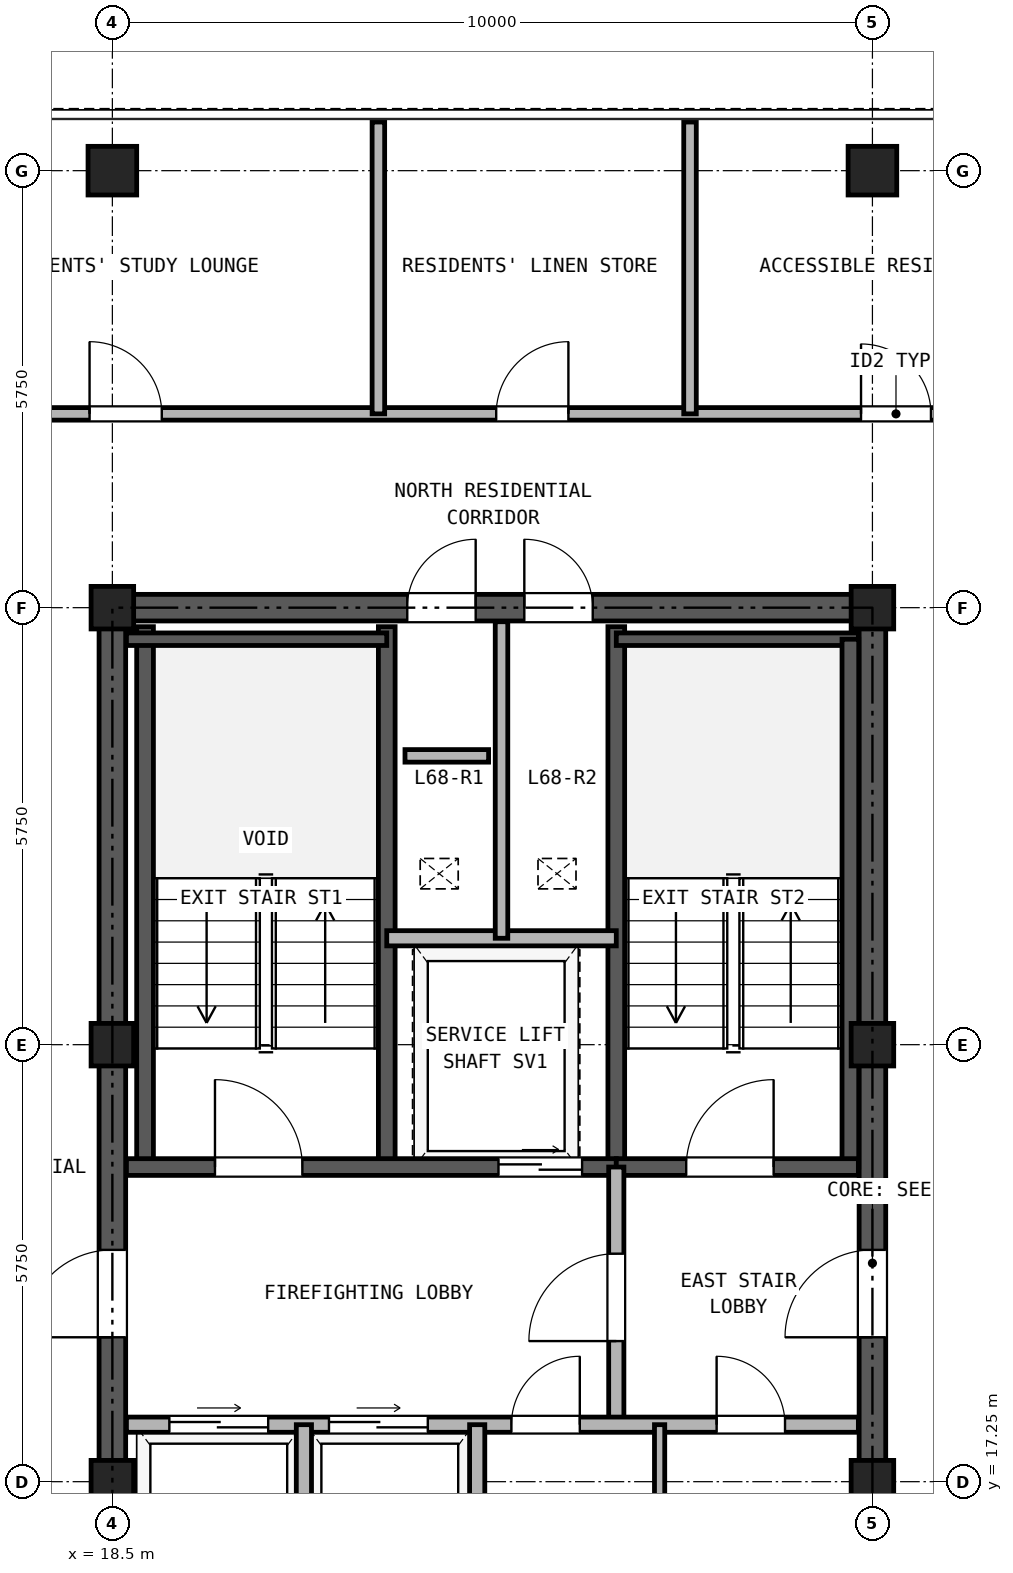
"""IFC4 building model, lengths in metres.
Left out: names, types, materials, properties, quantities, classifications, styles, units other than length and angle.
Written with IfcOpenShell. Run it as: python <this file> out.ifc"""

import sys

from ifc_helpers import new_model, si_unit, direction, frame, frame_2d, origin, origin_2d, place, context, subcontext, project, spatial, rectangle, hollow_rectangle, extrude, source, transform, mapped, element, fill, save


model = new_model("IFC4")
c1 = context("Model", 3, precision=1e-05, world=origin(), true_north=direction((0.0, 1.0)))
c2 = subcontext(c1, "Body", "Model", "MODEL_VIEW")
j1 = project(units=[si_unit("LENGTHUNIT", "METRE"), si_unit("PLANEANGLEUNIT", "RADIAN")], contexts=[c1])
p1 = place(None, origin())
s1 = spatial("IfcSite", under=j1, at=p1, CompositionType="ELEMENT")
p2 = place(p1, origin())
s2 = spatial("IfcBuilding", under=s1, at=p2, CompositionType="ELEMENT")
p3 = place(p2, frame((0.0, 0.0, 239.3)))
s3 = spatial("IfcBuildingStorey", under=s2, at=p3, CompositionType="ELEMENT", Elevation=239.3)
m1 = source(origin(), c2, "Body", "SweptSolid", [
    extrude(hollow_rectangle(XDim=0.64, YDim=0.64, WallThickness=0.035, at=origin_2d()), origin(), (0.0, 0.0, 1.0), 2.98),
])
for number, where, z_axis, x_axis in (
    (1, (18.5, 34.5, 0.0), (0.0, 0.0, 1.0), (1.0, 0.0, 0.0)),
    (2, (28.5, 34.5, 0.0), (0.0, 0.0, 1.0), (1.0, 0.0, 0.0)),
):
    element("IfcColumn", number, at=place(p3, frame(where, z_axis=z_axis, x_axis=x_axis)), inside=s3, PredefinedType="COLUMN", context=c2, shape_type="MappedRepresentation", body=[
        mapped(m1, transform((0.0, 0.0, 0.0), x_axis=(1.0, 0.0, 0.0), y_axis=(0.0, 1.0, 0.0), z_axis=(0.0, 0.0, 1.0), scale=1.0)),
    ])
m2 = source(origin(), c2, "Body", "SweptSolid", [
    extrude(hollow_rectangle(XDim=0.56, YDim=0.56, WallThickness=0.03, at=origin_2d()), origin(), (0.0, 0.0, 1.0), 2.98),
])
for number, where, z_axis, x_axis in (
    (3, (18.5, 17.25, 0.0), (0.0, 0.0, 1.0), (1.0, 0.0, 0.0)),
    (4, (18.5, 23.0, 0.0), (0.0, 0.0, 1.0), (1.0, 0.0, 0.0)),
    (5, (18.5, 28.75, 0.0), (0.0, 0.0, 1.0), (1.0, 0.0, 0.0)),
    (6, (28.5, 17.25, 0.0), (0.0, 0.0, 1.0), (1.0, 0.0, 0.0)),
    (7, (28.5, 23.0, 0.0), (0.0, 0.0, 1.0), (1.0, 0.0, 0.0)),
    (8, (28.5, 28.75, 0.0), (0.0, 0.0, 1.0), (1.0, 0.0, 0.0)),
):
    element("IfcColumn", number, at=place(p3, frame(where, z_axis=z_axis, x_axis=x_axis)), inside=s3, PredefinedType="COLUMN", context=c2, shape_type="MappedRepresentation", body=[
        mapped(m2, transform((0.0, 0.0, 0.0), x_axis=(1.0, 0.0, 0.0), y_axis=(0.0, 1.0, 0.0), z_axis=(0.0, 0.0, 1.0), scale=1.0)),
    ])
p4 = place(p3, frame((18.325, 28.75, 0.0), z_axis=(0.0, 0.0, 1.0), x_axis=(1.0, 0.0, 0.0)))
e9 = element("IfcWall", 9, at=p4, inside=s3, PredefinedType="SHEAR", context=c2, shape_type="SweptSolid", body=[
    extrude(rectangle(XDim=10.35, YDim=0.35, at=frame_2d((5.175, 0.0))), origin(), (0.0, 0.0, 1.0), 2.98),
])
p5 = place(p4, frame((4.055, 0.0, 0.0)))
e10 = element("IfcOpeningElement", 10, at=p5, cuts=e9, PredefinedType="OPENING", context=c2, shape_type="SweptSolid", body=[
    extrude(rectangle(XDim=0.9, YDim=2.05, at=frame_2d((0.45, 1.025))), frame((0.0, 0.185, 0.0), z_axis=(0.0, -1.0, 0.0), x_axis=(1.0, 0.0, 0.0)), (0.0, 0.0, 1.0), 0.37),
])
p6 = place(p4, frame((5.595, 0.0, 0.0)))
e11 = element("IfcOpeningElement", 11, at=p6, cuts=e9, PredefinedType="OPENING", context=c2, shape_type="SweptSolid", body=[
    extrude(rectangle(XDim=0.9, YDim=2.05, at=frame_2d((0.45, 1.025))), frame((0.0, 0.185, 0.0), z_axis=(0.0, -1.0, 0.0), x_axis=(1.0, 0.0, 0.0)), (0.0, 0.0, 1.0), 0.37),
])
p7 = place(p3, frame((18.5, 11.675, 0.0), z_axis=(0.0, 0.0, 1.0), x_axis=(0.0, 1.0, 0.0)))
e12 = element("IfcWall", 12, at=p7, inside=s3, PredefinedType="SHEAR", context=c2, shape_type="SweptSolid", body=[
    extrude(rectangle(XDim=16.9, YDim=0.35, at=frame_2d((8.45, 0.0))), origin(), (0.0, 0.0, 1.0), 2.98),
])
p8 = place(p7, frame((7.475, 0.0, 0.0)))
e13 = element("IfcOpeningElement", 13, at=p8, cuts=e12, PredefinedType="OPENING", context=c2, shape_type="SweptSolid", body=[
    extrude(rectangle(XDim=1.15, YDim=2.2, at=frame_2d((0.575, 1.1))), frame((0.0, 0.185, 0.0), z_axis=(0.0, -1.0, 0.0), x_axis=(1.0, 0.0, 0.0)), (0.0, 0.0, 1.0), 0.37),
])
p9 = place(p3, frame((28.5, 11.675, 0.0), z_axis=(0.0, 0.0, 1.0), x_axis=(0.0, 1.0, 0.0)))
e14 = element("IfcWall", 14, at=p9, inside=s3, PredefinedType="SHEAR", context=c2, shape_type="SweptSolid", body=[
    extrude(rectangle(XDim=16.9, YDim=0.35, at=frame_2d((8.45, 0.0))), origin(), (0.0, 0.0, 1.0), 2.98),
])
p10 = place(p9, frame((7.475, 0.0, 0.0)))
e15 = element("IfcOpeningElement", 15, at=p10, cuts=e14, PredefinedType="OPENING", context=c2, shape_type="SweptSolid", body=[
    extrude(rectangle(XDim=1.15, YDim=2.2, at=frame_2d((0.575, 1.1))), frame((0.0, 0.185, 0.0), z_axis=(0.0, -1.0, 0.0), x_axis=(1.0, 0.0, 0.0)), (0.0, 0.0, 1.0), 0.37),
])
for number, where, z_axis, x_axis in (
    (16, (18.93, 21.39, 0.0), (0.0, 0.0, 1.0), (0.0, 1.0, 0.0)),
    (17, (22.11, 21.39, 0.0), (0.0, 0.0, 1.0), (0.0, 1.0, 0.0)),
    (18, (25.13, 21.39, 0.0), (0.0, 0.0, 1.0), (0.0, 1.0, 0.0)),
):
    element("IfcWall", number, at=place(p3, frame(where, z_axis=z_axis, x_axis=x_axis)), inside=s3, PredefinedType="SOLIDWALL", context=c2, shape_type="SweptSolid", body=[
        extrude(rectangle(XDim=7.11, YDim=0.22, at=frame_2d((3.555, 0.0))), origin(), (0.0, 0.0, 1.0), 2.98),
    ])
p11 = place(p3, frame((18.685, 28.335, 0.0), z_axis=(0.0, 0.0, 1.0), x_axis=(1.0, 0.0, 0.0)))
e19 = element("IfcWall", 19, at=p11, inside=s3, PredefinedType="PARTITIONING", context=c2, shape_type="SweptSolid", body=[
    extrude(rectangle(XDim=3.425, YDim=0.165, at=frame_2d((1.712, 0.0))), origin(), (0.0, 0.0, 1.0), 2.98),
])
p12 = place(p3, frame((25.13, 28.335, 0.0), z_axis=(0.0, 0.0, 1.0), x_axis=(1.0, 0.0, 0.0)))
e20 = element("IfcWall", 20, at=p12, inside=s3, PredefinedType="PARTITIONING", context=c2, shape_type="SweptSolid", body=[
    extrude(rectangle(XDim=3.185, YDim=0.165, at=frame_2d((1.593, 0.0))), origin(), (0.0, 0.0, 1.0), 2.98),
])
p13 = place(p3, frame((28.21, 21.39, 0.0), z_axis=(0.0, 0.0, 1.0), x_axis=(0.0, 1.0, 0.0)))
e21 = element("IfcWall", 21, at=p13, inside=s3, PredefinedType="SOLIDWALL", context=c2, shape_type="SweptSolid", body=[
    extrude(rectangle(XDim=6.945, YDim=0.22, at=frame_2d((3.473, 0.0))), origin(), (0.0, 0.0, 1.0), 2.98),
])
p14 = place(p3, frame((18.685, 21.39, 0.0), z_axis=(0.0, 0.0, 1.0), x_axis=(1.0, 0.0, 0.0)))
e22 = element("IfcWall", 22, at=p14, inside=s3, PredefinedType="SOLIDWALL", context=c2, shape_type="SweptSolid", body=[
    extrude(rectangle(XDim=6.445, YDim=0.22, at=frame_2d((3.222, 0.0))), origin(), (0.0, 0.0, 1.0), 2.98),
])
p15 = place(p14, frame((1.165, 0.0, 0.0)))
e23 = element("IfcOpeningElement", 23, at=p15, cuts=e22, PredefinedType="OPENING", context=c2, shape_type="SweptSolid", body=[
    extrude(rectangle(XDim=1.15, YDim=2.2, at=frame_2d((0.575, 1.1))), frame((0.0, 0.12, 0.0), z_axis=(0.0, -1.0, 0.0), x_axis=(1.0, 0.0, 0.0)), (0.0, 0.0, 1.0), 0.24),
])
p16 = place(p14, frame((4.895, 0.0, 0.0)))
e24 = element("IfcOpeningElement", 24, at=p16, cuts=e22, PredefinedType="OPENING", context=c2, shape_type="SweptSolid", body=[
    extrude(rectangle(XDim=1.1, YDim=2.25, at=frame_2d((0.55, 1.125))), frame((0.0, 0.12, 0.0), z_axis=(0.0, -1.0, 0.0), x_axis=(1.0, 0.0, 0.0)), (0.0, 0.0, 1.0), 0.24),
])
p17 = place(p3, frame((25.13, 21.39, 0.0), z_axis=(0.0, 0.0, 1.0), x_axis=(1.0, 0.0, 0.0)))
e25 = element("IfcWall", 25, at=p17, inside=s3, PredefinedType="SOLIDWALL", context=c2, shape_type="SweptSolid", body=[
    extrude(rectangle(XDim=3.185, YDim=0.22, at=frame_2d((1.593, 0.0))), origin(), (0.0, 0.0, 1.0), 2.98),
])
p18 = place(p17, frame((0.92, 0.0, 0.0)))
e26 = element("IfcOpeningElement", 26, at=p18, cuts=e25, PredefinedType="OPENING", context=c2, shape_type="SweptSolid", body=[
    extrude(rectangle(XDim=1.15, YDim=2.2, at=frame_2d((0.575, 1.1))), frame((0.0, 0.12, 0.0), z_axis=(0.0, -1.0, 0.0), x_axis=(1.0, 0.0, 0.0)), (0.0, 0.0, 1.0), 0.24),
])
p19 = place(p3, frame((22.11, 24.4, 0.0), z_axis=(0.0, 0.0, 1.0), x_axis=(1.0, 0.0, 0.0)))
e27 = element("IfcWall", 27, at=p19, inside=s3, PredefinedType="PARTITIONING", context=c2, shape_type="SweptSolid", body=[
    extrude(rectangle(XDim=3.02, YDim=0.2, at=frame_2d((1.51, 0.0))), origin(), (0.0, 0.0, 1.0), 2.98),
])
p20 = place(p3, frame((23.62, 24.4, 0.0), z_axis=(0.0, 0.0, 1.0), x_axis=(0.0, 1.0, 0.0)))
e28 = element("IfcWall", 28, at=p20, inside=s3, PredefinedType="PARTITIONING", context=c2, shape_type="SweptSolid", body=[
    extrude(rectangle(XDim=4.165, YDim=0.165, at=frame_2d((2.083, 0.0))), origin(), (0.0, 0.0, 1.0), 2.98),
])
p21 = place(p3, frame((25.13, 18.0, 0.0), z_axis=(0.0, 0.0, 1.0), x_axis=(0.0, 1.0, 0.0)))
e29 = element("IfcWall", 29, at=p21, inside=s3, PredefinedType="PARTITIONING", context=c2, shape_type="SweptSolid", body=[
    extrude(rectangle(XDim=3.39, YDim=0.2, at=frame_2d((1.695, 0.0))), origin(), (0.0, 0.0, 1.0), 2.98),
])
p22 = place(p21, frame((1.1, 0.0, 0.0)))
e30 = element("IfcOpeningElement", 30, at=p22, cuts=e29, PredefinedType="OPENING", context=c2, shape_type="SweptSolid", body=[
    extrude(rectangle(XDim=1.15, YDim=2.2, at=frame_2d((0.575, 1.1))), frame((0.0, 0.11, 0.0), z_axis=(0.0, -1.0, 0.0), x_axis=(1.0, 0.0, 0.0)), (0.0, 0.0, 1.0), 0.22),
])
p23 = place(p3, frame((18.685, 18.0, 0.0), z_axis=(0.0, 0.0, 1.0), x_axis=(1.0, 0.0, 0.0)))
e31 = element("IfcWall", 31, at=p23, inside=s3, PredefinedType="PARTITIONING", context=c2, shape_type="SweptSolid", body=[
    extrude(rectangle(XDim=9.63, YDim=0.2, at=frame_2d((4.815, 0.0))), origin(), (0.0, 0.0, 1.0), 2.98),
])
p24 = place(p23, frame((0.565, 0.0, 0.0)))
e32 = element("IfcOpeningElement", 32, at=p24, cuts=e31, PredefinedType="OPENING", context=c2, shape_type="SweptSolid", body=[
    extrude(rectangle(XDim=1.3, YDim=2.3, at=frame_2d((0.65, 1.15))), frame((0.0, 0.11, 0.0), z_axis=(0.0, -1.0, 0.0), x_axis=(1.0, 0.0, 0.0)), (0.0, 0.0, 1.0), 0.22),
])
p25 = place(p23, frame((2.665, 0.0, 0.0)))
e33 = element("IfcOpeningElement", 33, at=p25, cuts=e31, PredefinedType="OPENING", context=c2, shape_type="SweptSolid", body=[
    extrude(rectangle(XDim=1.3, YDim=2.3, at=frame_2d((0.65, 1.15))), frame((0.0, 0.11, 0.0), z_axis=(0.0, -1.0, 0.0), x_axis=(1.0, 0.0, 0.0)), (0.0, 0.0, 1.0), 0.22),
])
p26 = place(p23, frame((5.065, 0.0, 0.0)))
e34 = element("IfcOpeningElement", 34, at=p26, cuts=e31, PredefinedType="OPENING", context=c2, shape_type="SweptSolid", body=[
    extrude(rectangle(XDim=0.9, YDim=2.05, at=frame_2d((0.45, 1.025))), frame((0.0, 0.11, 0.0), z_axis=(0.0, -1.0, 0.0), x_axis=(1.0, 0.0, 0.0)), (0.0, 0.0, 1.0), 0.22),
])
p27 = place(p23, frame((7.765, 0.0, 0.0)))
e35 = element("IfcOpeningElement", 35, at=p27, cuts=e31, PredefinedType="OPENING", context=c2, shape_type="SweptSolid", body=[
    extrude(rectangle(XDim=0.9, YDim=2.05, at=frame_2d((0.45, 1.025))), frame((0.0, 0.11, 0.0), z_axis=(0.0, -1.0, 0.0), x_axis=(1.0, 0.0, 0.0)), (0.0, 0.0, 1.0), 0.22),
])
for number, where, z_axis, x_axis in (
    (36, (21.02, 15.0, 0.0), (0.0, 0.0, 1.0), (0.0, 1.0, 0.0)),
    (37, (23.3, 15.0, 0.0), (0.0, 0.0, 1.0), (0.0, 1.0, 0.0)),
):
    element("IfcWall", number, at=place(p3, frame(where, z_axis=z_axis, x_axis=x_axis)), inside=s3, PredefinedType="PARTITIONING", context=c2, shape_type="SweptSolid", body=[
        extrude(rectangle(XDim=3.0, YDim=0.2, at=frame_2d((1.5, 0.0))), origin(), (0.0, 0.0, 1.0), 2.98),
    ])
p28 = place(p3, frame((25.7, 15.0, 0.0), z_axis=(0.0, 0.0, 1.0), x_axis=(0.0, 1.0, 0.0)))
e38 = element("IfcWall", 38, at=p28, inside=s3, PredefinedType="PARTITIONING", context=c2, shape_type="SweptSolid", body=[
    extrude(rectangle(XDim=3.0, YDim=0.135, at=frame_2d((1.5, 0.0))), origin(), (0.0, 0.0, 1.0), 2.98),
])
p29 = place(p3, frame((15.4, 31.3, 0.0), z_axis=(0.0, 0.0, 1.0), x_axis=(1.0, 0.0, 0.0)))
e39 = element("IfcWall", 39, at=p29, inside=s3, PredefinedType="PARTITIONING", context=c2, shape_type="SweptSolid", body=[
    extrude(rectangle(XDim=16.2, YDim=0.165, at=frame_2d((8.1, 0.0))), origin(), (0.0, 0.0, 1.0), 2.98),
])
p30 = place(p29, frame((2.8, 0.0, 0.0)))
e40 = element("IfcOpeningElement", 40, at=p30, cuts=e39, PredefinedType="OPENING", context=c2, shape_type="SweptSolid", body=[
    extrude(rectangle(XDim=0.95, YDim=2.15, at=frame_2d((0.475, 1.075))), frame((0.0, 0.093, 0.0), z_axis=(0.0, -1.0, 0.0), x_axis=(1.0, 0.0, 0.0)), (0.0, 0.0, 1.0), 0.185),
])
p31 = place(p29, frame((8.15, 0.0, 0.0)))
e41 = element("IfcOpeningElement", 41, at=p31, cuts=e39, PredefinedType="OPENING", context=c2, shape_type="SweptSolid", body=[
    extrude(rectangle(XDim=0.95, YDim=2.15, at=frame_2d((0.475, 1.075))), frame((0.0, 0.093, 0.0), z_axis=(0.0, -1.0, 0.0), x_axis=(1.0, 0.0, 0.0)), (0.0, 0.0, 1.0), 0.185),
])
p32 = place(p29, frame((12.95, 0.0, 0.0)))
e42 = element("IfcOpeningElement", 42, at=p32, cuts=e39, PredefinedType="OPENING", context=c2, shape_type="SweptSolid", body=[
    extrude(rectangle(XDim=0.92, YDim=2.1, at=frame_2d((0.46, 1.05))), frame((0.0, 0.093, 0.0), z_axis=(0.0, -1.0, 0.0), x_axis=(1.0, 0.0, 0.0)), (0.0, 0.0, 1.0), 0.185),
])
for number, where, z_axis, x_axis in (
    (43, (22.0, 31.3, 0.0), (0.0, 0.0, 1.0), (0.0, 1.0, 0.0)),
    (44, (26.1, 31.3, 0.0), (0.0, 0.0, 1.0), (0.0, 1.0, 0.0)),
):
    element("IfcWall", number, at=place(p3, frame(where, z_axis=z_axis, x_axis=x_axis)), inside=s3, PredefinedType="PARTITIONING", context=c2, shape_type="SweptSolid", body=[
        extrude(rectangle(XDim=3.84, YDim=0.165, at=frame_2d((1.92, 0.0))), origin(), (0.0, 0.0, 1.0), 2.98),
    ])
p33 = place(p3, frame((22.35, 26.8, 0.0), z_axis=(0.0, 0.0, 1.0), x_axis=(1.0, 0.0, 0.0)))
e45 = element("IfcWall", 45, at=p33, inside=s3, PredefinedType="PARTITIONING", context=c2, shape_type="SweptSolid", body=[
    extrude(rectangle(XDim=1.1, YDim=0.165, at=frame_2d((0.55, 0.0))), origin(), (0.0, 0.0, 1.0), 2.98),
])
p34 = place(p15, frame((1.15, 0.0, 0.0), z_axis=(0.0, 0.0, 1.0), x_axis=(-1.0, 0.0, 0.0)))
e46 = element("IfcDoor", 46, at=p34, inside=s3, OperationType="SINGLE_SWING_LEFT", PredefinedType="DOOR", context=c2, shape_type="SweptSolid", body=[
    extrude(rectangle(XDim=1.15, YDim=2.2, at=frame_2d((0.575, 1.1))), frame((0.0, 0.025, 0.0), z_axis=(0.0, -1.0, 0.0), x_axis=(1.0, 0.0, 0.0)), (0.0, 0.0, 1.0), 0.05),
])
fill(e23, e46)
p35 = place(p18, frame((1.15, 0.0, 0.0), z_axis=(0.0, 0.0, 1.0), x_axis=(-1.0, 0.0, 0.0)))
e47 = element("IfcDoor", 47, at=p35, inside=s3, OperationType="SINGLE_SWING_RIGHT", PredefinedType="DOOR", context=c2, shape_type="SweptSolid", body=[
    extrude(rectangle(XDim=1.15, YDim=2.2, at=frame_2d((0.575, 1.1))), frame((0.0, 0.025, 0.0), z_axis=(0.0, -1.0, 0.0), x_axis=(1.0, 0.0, 0.0)), (0.0, 0.0, 1.0), 0.05),
])
fill(e26, e47)
p36 = place(p16, frame((1.1, 0.0, 0.0), z_axis=(0.0, 0.0, 1.0), x_axis=(-1.0, 0.0, 0.0)))
e48 = element("IfcDoor", 48, at=p36, inside=s3, OperationType="DOUBLE_DOOR_SLIDING", PredefinedType="DOOR", context=c2, shape_type="SweptSolid", body=[
    extrude(rectangle(XDim=1.1, YDim=2.25, at=frame_2d((0.55, 1.125))), frame((0.0, 0.025, 0.0), z_axis=(0.0, -1.0, 0.0), x_axis=(1.0, 0.0, 0.0)), (0.0, 0.0, 1.0), 0.05),
])
fill(e24, e48)
p37 = place(p22, origin())
e49 = element("IfcDoor", 49, at=p37, inside=s3, OperationType="SINGLE_SWING_LEFT", PredefinedType="DOOR", context=c2, shape_type="SweptSolid", body=[
    extrude(rectangle(XDim=1.15, YDim=2.2, at=frame_2d((0.575, 1.1))), frame((0.0, 0.025, 0.0), z_axis=(0.0, -1.0, 0.0), x_axis=(1.0, 0.0, 0.0)), (0.0, 0.0, 1.0), 0.05),
])
fill(e30, e49)
p38 = place(p24, origin())
e50 = element("IfcDoor", 50, at=p38, inside=s3, OperationType="DOUBLE_DOOR_SLIDING", PredefinedType="DOOR", context=c2, shape_type="SweptSolid", body=[
    extrude(rectangle(XDim=1.3, YDim=2.3, at=frame_2d((0.65, 1.15))), frame((0.0, 0.025, 0.0), z_axis=(0.0, -1.0, 0.0), x_axis=(1.0, 0.0, 0.0)), (0.0, 0.0, 1.0), 0.05),
])
fill(e32, e50)
p39 = place(p25, origin())
e51 = element("IfcDoor", 51, at=p39, inside=s3, OperationType="DOUBLE_DOOR_SLIDING", PredefinedType="DOOR", context=c2, shape_type="SweptSolid", body=[
    extrude(rectangle(XDim=1.3, YDim=2.3, at=frame_2d((0.65, 1.15))), frame((0.0, 0.025, 0.0), z_axis=(0.0, -1.0, 0.0), x_axis=(1.0, 0.0, 0.0)), (0.0, 0.0, 1.0), 0.05),
])
fill(e33, e51)
p40 = place(p26, frame((0.9, 0.0, 0.0), z_axis=(0.0, 0.0, 1.0), x_axis=(-1.0, 0.0, 0.0)))
e52 = element("IfcDoor", 52, at=p40, inside=s3, OperationType="SINGLE_SWING_RIGHT", PredefinedType="DOOR", context=c2, shape_type="SweptSolid", body=[
    extrude(rectangle(XDim=0.9, YDim=2.05, at=frame_2d((0.45, 1.025))), frame((0.0, 0.025, 0.0), z_axis=(0.0, -1.0, 0.0), x_axis=(1.0, 0.0, 0.0)), (0.0, 0.0, 1.0), 0.05),
])
fill(e34, e52)
p41 = place(p27, frame((0.9, 0.0, 0.0), z_axis=(0.0, 0.0, 1.0), x_axis=(-1.0, 0.0, 0.0)))
e53 = element("IfcDoor", 53, at=p41, inside=s3, OperationType="SINGLE_SWING_LEFT", PredefinedType="DOOR", context=c2, shape_type="SweptSolid", body=[
    extrude(rectangle(XDim=0.9, YDim=2.05, at=frame_2d((0.45, 1.025))), frame((0.0, 0.025, 0.0), z_axis=(0.0, -1.0, 0.0), x_axis=(1.0, 0.0, 0.0)), (0.0, 0.0, 1.0), 0.05),
])
fill(e35, e53)
p42 = place(p8, frame((1.15, 0.0, 0.0), z_axis=(0.0, 0.0, 1.0), x_axis=(-1.0, 0.0, 0.0)))
e54 = element("IfcDoor", 54, at=p42, inside=s3, OperationType="SINGLE_SWING_LEFT", PredefinedType="DOOR", context=c2, shape_type="SweptSolid", body=[
    extrude(rectangle(XDim=1.15, YDim=2.2, at=frame_2d((0.575, 1.1))), frame((0.0, 0.025, 0.0), z_axis=(0.0, -1.0, 0.0), x_axis=(1.0, 0.0, 0.0)), (0.0, 0.0, 1.0), 0.05),
])
fill(e13, e54)
p43 = place(p10, origin())
e55 = element("IfcDoor", 55, at=p43, inside=s3, OperationType="SINGLE_SWING_LEFT", PredefinedType="DOOR", context=c2, shape_type="SweptSolid", body=[
    extrude(rectangle(XDim=1.15, YDim=2.2, at=frame_2d((0.575, 1.1))), frame((0.0, 0.025, 0.0), z_axis=(0.0, -1.0, 0.0), x_axis=(1.0, 0.0, 0.0)), (0.0, 0.0, 1.0), 0.05),
])
fill(e15, e55)
p44 = place(p5, origin())
e56 = element("IfcDoor", 56, at=p44, inside=s3, OperationType="SINGLE_SWING_RIGHT", PredefinedType="DOOR", context=c2, shape_type="SweptSolid", body=[
    extrude(rectangle(XDim=0.9, YDim=2.05, at=frame_2d((0.45, 1.025))), frame((0.0, 0.025, 0.0), z_axis=(0.0, -1.0, 0.0), x_axis=(1.0, 0.0, 0.0)), (0.0, 0.0, 1.0), 0.05),
])
fill(e10, e56)
p45 = place(p6, origin())
e57 = element("IfcDoor", 57, at=p45, inside=s3, OperationType="SINGLE_SWING_LEFT", PredefinedType="DOOR", context=c2, shape_type="SweptSolid", body=[
    extrude(rectangle(XDim=0.9, YDim=2.05, at=frame_2d((0.45, 1.025))), frame((0.0, 0.025, 0.0), z_axis=(0.0, -1.0, 0.0), x_axis=(1.0, 0.0, 0.0)), (0.0, 0.0, 1.0), 0.05),
])
fill(e11, e57)
p46 = place(p30, origin())
e58 = element("IfcDoor", 58, at=p46, inside=s3, OperationType="SINGLE_SWING_LEFT", PredefinedType="DOOR", context=c2, shape_type="SweptSolid", body=[
    extrude(rectangle(XDim=0.95, YDim=2.15, at=frame_2d((0.475, 1.075))), frame((0.0, 0.025, 0.0), z_axis=(0.0, -1.0, 0.0), x_axis=(1.0, 0.0, 0.0)), (0.0, 0.0, 1.0), 0.05),
])
fill(e40, e58)
p47 = place(p31, origin())
e59 = element("IfcDoor", 59, at=p47, inside=s3, OperationType="SINGLE_SWING_RIGHT", PredefinedType="DOOR", context=c2, shape_type="SweptSolid", body=[
    extrude(rectangle(XDim=0.95, YDim=2.15, at=frame_2d((0.475, 1.075))), frame((0.0, 0.025, 0.0), z_axis=(0.0, -1.0, 0.0), x_axis=(1.0, 0.0, 0.0)), (0.0, 0.0, 1.0), 0.05),
])
fill(e41, e59)
p48 = place(p32, origin())
e60 = element("IfcDoor", 60, at=p48, inside=s3, OperationType="SINGLE_SWING_LEFT", PredefinedType="DOOR", context=c2, shape_type="SweptSolid", body=[
    extrude(rectangle(XDim=0.92, YDim=2.1, at=frame_2d((0.46, 1.05))), frame((0.0, 0.025, 0.0), z_axis=(0.0, -1.0, 0.0), x_axis=(1.0, 0.0, 0.0)), (0.0, 0.0, 1.0), 0.05),
])
fill(e42, e60)
save(model, sys.argv[1])
